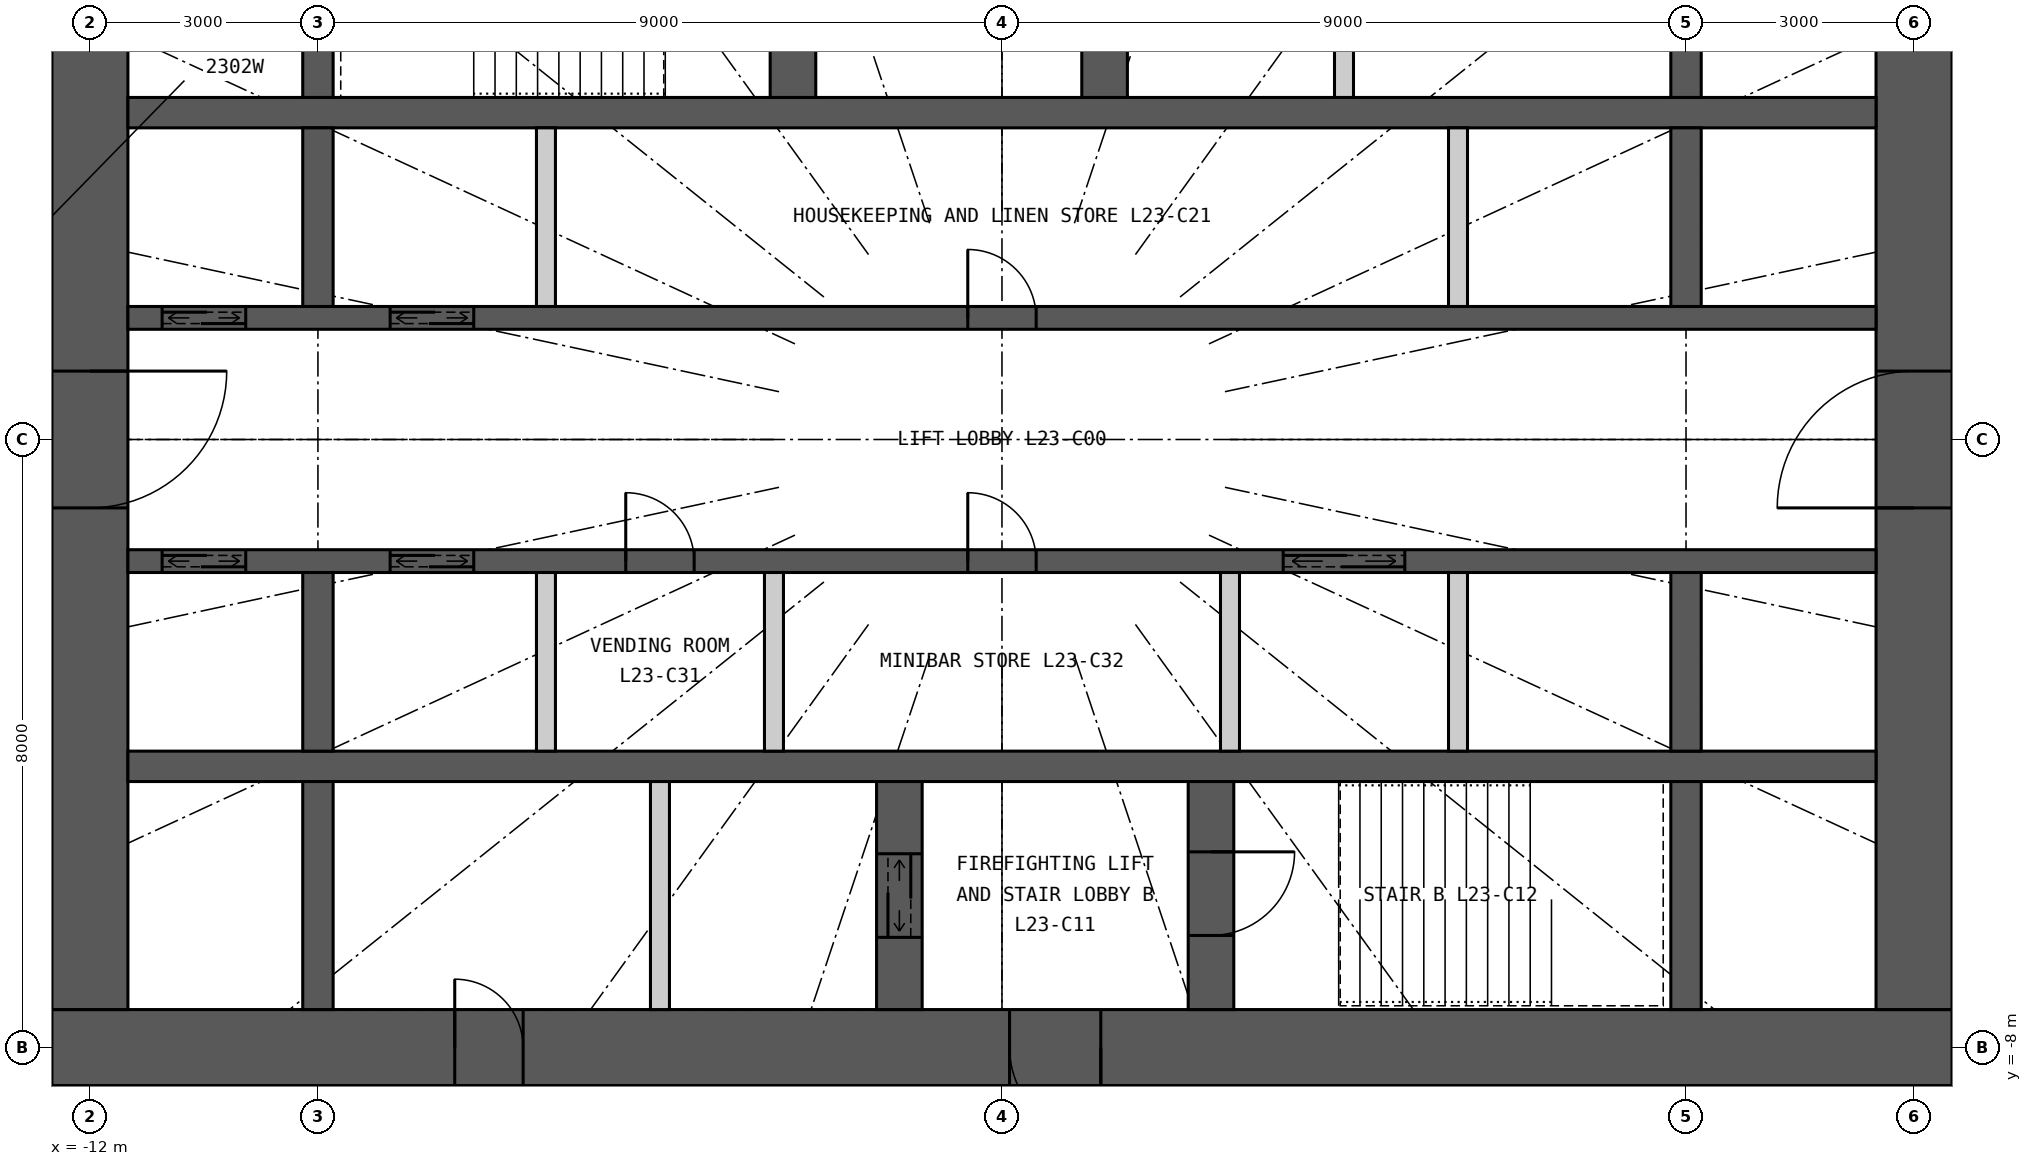
"""IFC4 building model, lengths in metres.
Left out: names, types, materials, properties, quantities, classifications, styles, units other than length and angle.
Written with IfcOpenShell. Run it as: python <this file> out.ifc"""

import sys

from ifc_helpers import new_model, si_unit, direction, frame, frame_2d, origin, place, context, subcontext, project, spatial, rectangle, extrude, element, fill, save


model = new_model("IFC4")
c1 = context("Model", 3, precision=1e-05, world=origin(), true_north=direction((0.0, 1.0)))
c2 = subcontext(c1, "Body", "Model", "MODEL_VIEW")
j1 = project(units=[si_unit("LENGTHUNIT", "METRE"), si_unit("PLANEANGLEUNIT", "RADIAN")], contexts=[c1])
p1 = place(None, origin())
s1 = spatial("IfcSite", under=j1, at=p1, CompositionType="ELEMENT")
p2 = place(p1, origin())
s2 = spatial("IfcBuilding", under=s1, at=p2, CompositionType="ELEMENT")
p3 = place(p2, frame((0.0, 0.0, 90.3)))
s3 = spatial("IfcBuildingStorey", under=s2, at=p3, CompositionType="ELEMENT", Elevation=90.3)
p4 = place(p3, frame((12.5, -8.0, 0.0), z_axis=(0.0, 0.0, 1.0), x_axis=(-1.0, 0.0, 0.0)))
e1 = element("IfcWall", 1, at=p4, inside=s3, PredefinedType="SHEAR", context=c2, shape_type="SweptSolid", body=[
    extrude(rectangle(XDim=25.0, YDim=1.0, at=frame_2d((12.5, 0.0))), origin(), (0.0, 0.0, 1.0), 3.3),
])
p5 = place(p4, frame((11.2, 0.0, 0.0)))
e2 = element("IfcOpeningElement", 2, at=p5, cuts=e1, PredefinedType="OPENING", context=c2, shape_type="SweptSolid", body=[
    extrude(rectangle(XDim=1.2, YDim=2.2, at=frame_2d((0.6, 1.1))), frame((0.0, 0.51, 0.0), z_axis=(0.0, -1.0, 0.0), x_axis=(1.0, 0.0, 0.0)), (0.0, 0.0, 1.0), 1.02),
])
p6 = place(p4, frame((18.8, 0.0, 0.0)))
e3 = element("IfcOpeningElement", 3, at=p6, cuts=e1, PredefinedType="OPENING", context=c2, shape_type="SweptSolid", body=[
    extrude(rectangle(XDim=0.9, YDim=2.2, at=frame_2d((0.45, 1.1))), frame((0.0, 0.51, 0.0), z_axis=(0.0, -1.0, 0.0), x_axis=(1.0, 0.0, 0.0)), (0.0, 0.0, 1.0), 1.02),
])
p7 = place(p3, frame((12.0, -7.5, 0.0), z_axis=(0.0, 0.0, 1.0), x_axis=(0.0, 1.0, 0.0)))
e4 = element("IfcWall", 4, at=p7, inside=s3, PredefinedType="SHEAR", context=c2, shape_type="SweptSolid", body=[
    extrude(rectangle(XDim=15.0, YDim=1.0, at=frame_2d((7.5, 0.0))), origin(), (0.0, 0.0, 1.0), 3.3),
])
p8 = place(p7, frame((6.6, 0.0, 0.0)))
e5 = element("IfcOpeningElement", 5, at=p8, cuts=e4, PredefinedType="OPENING", context=c2, shape_type="SweptSolid", body=[
    extrude(rectangle(XDim=1.8, YDim=2.2, at=frame_2d((0.9, 1.1))), frame((0.0, 0.51, 0.0), z_axis=(0.0, -1.0, 0.0), x_axis=(1.0, 0.0, 0.0)), (0.0, 0.0, 1.0), 1.02),
])
p9 = place(p3, frame((-12.0, 7.5, 0.0), z_axis=(0.0, 0.0, 1.0), x_axis=(0.0, -1.0, 0.0)))
e6 = element("IfcWall", 6, at=p9, inside=s3, PredefinedType="SHEAR", context=c2, shape_type="SweptSolid", body=[
    extrude(rectangle(XDim=15.0, YDim=1.0, at=frame_2d((7.5, 0.0))), origin(), (0.0, 0.0, 1.0), 3.3),
])
p10 = place(p9, frame((6.6, 0.0, 0.0)))
e7 = element("IfcOpeningElement", 7, at=p10, cuts=e6, PredefinedType="OPENING", context=c2, shape_type="SweptSolid", body=[
    extrude(rectangle(XDim=1.8, YDim=2.2, at=frame_2d((0.9, 1.1))), frame((0.0, 0.51, 0.0), z_axis=(0.0, -1.0, 0.0), x_axis=(1.0, 0.0, 0.0)), (0.0, 0.0, 1.0), 1.02),
])
p11 = place(p3, frame((-11.5, 4.3, 0.0), z_axis=(0.0, 0.0, 1.0), x_axis=(1.0, 0.0, 0.0)))
e8 = element("IfcWall", 8, at=p11, inside=s3, PredefinedType="SHEAR", context=c2, shape_type="SweptSolid", body=[
    extrude(rectangle(XDim=23.0, YDim=0.4, at=frame_2d((11.5, 0.0))), origin(), (0.0, 0.0, 1.0), 3.3),
])
p12 = place(p3, frame((-11.5, 1.6, 0.0), z_axis=(0.0, 0.0, 1.0), x_axis=(1.0, 0.0, 0.0)))
e9 = element("IfcWall", 9, at=p12, inside=s3, PredefinedType="SHEAR", context=c2, shape_type="SweptSolid", body=[
    extrude(rectangle(XDim=23.0, YDim=0.3, at=frame_2d((11.5, 0.0))), origin(), (0.0, 0.0, 1.0), 3.3),
])
p13 = place(p12, frame((0.45, 0.0, 0.0)))
e10 = element("IfcOpeningElement", 10, at=p13, cuts=e9, PredefinedType="OPENING", context=c2, shape_type="SweptSolid", body=[
    extrude(rectangle(XDim=1.1, YDim=2.2, at=frame_2d((0.55, 1.1))), frame((0.0, 0.16, 0.0), z_axis=(0.0, -1.0, 0.0), x_axis=(1.0, 0.0, 0.0)), (0.0, 0.0, 1.0), 0.32),
])
p14 = place(p12, frame((3.45, 0.0, 0.0)))
e11 = element("IfcOpeningElement", 11, at=p14, cuts=e9, PredefinedType="OPENING", context=c2, shape_type="SweptSolid", body=[
    extrude(rectangle(XDim=1.1, YDim=2.2, at=frame_2d((0.55, 1.1))), frame((0.0, 0.16, 0.0), z_axis=(0.0, -1.0, 0.0), x_axis=(1.0, 0.0, 0.0)), (0.0, 0.0, 1.0), 0.32),
])
p15 = place(p12, frame((11.05, 0.0, 0.0)))
e12 = element("IfcOpeningElement", 12, at=p15, cuts=e9, PredefinedType="OPENING", context=c2, shape_type="SweptSolid", body=[
    extrude(rectangle(XDim=0.9, YDim=2.2, at=frame_2d((0.45, 1.1))), frame((0.0, 0.16, 0.0), z_axis=(0.0, -1.0, 0.0), x_axis=(1.0, 0.0, 0.0)), (0.0, 0.0, 1.0), 0.32),
])
p16 = place(p3, frame((-11.5, -4.3, 0.0), z_axis=(0.0, 0.0, 1.0), x_axis=(1.0, 0.0, 0.0)))
e13 = element("IfcWall", 13, at=p16, inside=s3, PredefinedType="SHEAR", context=c2, shape_type="SweptSolid", body=[
    extrude(rectangle(XDim=23.0, YDim=0.4, at=frame_2d((11.5, 0.0))), origin(), (0.0, 0.0, 1.0), 3.3),
])
p17 = place(p3, frame((-11.5, -1.6, 0.0), z_axis=(0.0, 0.0, 1.0), x_axis=(1.0, 0.0, 0.0)))
e14 = element("IfcWall", 14, at=p17, inside=s3, PredefinedType="SHEAR", context=c2, shape_type="SweptSolid", body=[
    extrude(rectangle(XDim=23.0, YDim=0.3, at=frame_2d((11.5, 0.0))), origin(), (0.0, 0.0, 1.0), 3.3),
])
p18 = place(p17, frame((0.45, 0.0, 0.0)))
e15 = element("IfcOpeningElement", 15, at=p18, cuts=e14, PredefinedType="OPENING", context=c2, shape_type="SweptSolid", body=[
    extrude(rectangle(XDim=1.1, YDim=2.2, at=frame_2d((0.55, 1.1))), frame((0.0, 0.16, 0.0), z_axis=(0.0, -1.0, 0.0), x_axis=(1.0, 0.0, 0.0)), (0.0, 0.0, 1.0), 0.32),
])
p19 = place(p17, frame((3.45, 0.0, 0.0)))
e16 = element("IfcOpeningElement", 16, at=p19, cuts=e14, PredefinedType="OPENING", context=c2, shape_type="SweptSolid", body=[
    extrude(rectangle(XDim=1.1, YDim=2.2, at=frame_2d((0.55, 1.1))), frame((0.0, 0.16, 0.0), z_axis=(0.0, -1.0, 0.0), x_axis=(1.0, 0.0, 0.0)), (0.0, 0.0, 1.0), 0.32),
])
p20 = place(p17, frame((15.2, 0.0, 0.0)))
e17 = element("IfcOpeningElement", 17, at=p20, cuts=e14, PredefinedType="OPENING", context=c2, shape_type="SweptSolid", body=[
    extrude(rectangle(XDim=1.6, YDim=2.4, at=frame_2d((0.8, 1.2))), frame((0.0, 0.16, 0.0), z_axis=(0.0, -1.0, 0.0), x_axis=(1.0, 0.0, 0.0)), (0.0, 0.0, 1.0), 0.32),
])
p21 = place(p17, frame((6.55, 0.0, 0.0)))
e18 = element("IfcOpeningElement", 18, at=p21, cuts=e14, PredefinedType="OPENING", context=c2, shape_type="SweptSolid", body=[
    extrude(rectangle(XDim=0.9, YDim=2.2, at=frame_2d((0.45, 1.1))), frame((0.0, 0.16, 0.0), z_axis=(0.0, -1.0, 0.0), x_axis=(1.0, 0.0, 0.0)), (0.0, 0.0, 1.0), 0.32),
])
p22 = place(p17, frame((11.05, 0.0, 0.0)))
e19 = element("IfcOpeningElement", 19, at=p22, cuts=e14, PredefinedType="OPENING", context=c2, shape_type="SweptSolid", body=[
    extrude(rectangle(XDim=0.9, YDim=2.2, at=frame_2d((0.45, 1.1))), frame((0.0, 0.16, 0.0), z_axis=(0.0, -1.0, 0.0), x_axis=(1.0, 0.0, 0.0)), (0.0, 0.0, 1.0), 0.32),
])
p23 = place(p3, frame((-9.0, 4.5, 0.0), z_axis=(0.0, 0.0, 1.0), x_axis=(0.0, 1.0, 0.0)))
e20 = element("IfcWall", 20, at=p23, inside=s3, PredefinedType="SHEAR", context=c2, shape_type="SweptSolid", body=[
    extrude(rectangle(XDim=3.0, YDim=0.4, at=frame_2d((1.5, 0.0))), origin(), (0.0, 0.0, 1.0), 3.3),
])
for number, where, z_axis, x_axis in (
    (21, (-9.0, 1.75, 0.0), (0.0, 0.0, 1.0), (0.0, 1.0, 0.0)),
    (22, (-9.0, -4.1, 0.0), (0.0, 0.0, 1.0), (0.0, 1.0, 0.0)),
):
    element("IfcWall", number, at=place(p3, frame(where, z_axis=z_axis, x_axis=x_axis)), inside=s3, PredefinedType="SHEAR", context=c2, shape_type="SweptSolid", body=[
        extrude(rectangle(XDim=2.35, YDim=0.4, at=frame_2d((1.175, 0.0))), origin(), (0.0, 0.0, 1.0), 3.3),
    ])
for number, where, z_axis, x_axis in (
    (23, (-9.0, -7.5, 0.0), (0.0, 0.0, 1.0), (0.0, 1.0, 0.0)),
    (24, (9.0, 4.5, 0.0), (0.0, 0.0, 1.0), (0.0, 1.0, 0.0)),
):
    element("IfcWall", number, at=place(p3, frame(where, z_axis=z_axis, x_axis=x_axis)), inside=s3, PredefinedType="SHEAR", context=c2, shape_type="SweptSolid", body=[
        extrude(rectangle(XDim=3.0, YDim=0.4, at=frame_2d((1.5, 0.0))), origin(), (0.0, 0.0, 1.0), 3.3),
    ])
for number, where, z_axis, x_axis in (
    (25, (9.0, 1.75, 0.0), (0.0, 0.0, 1.0), (0.0, 1.0, 0.0)),
    (26, (9.0, -4.1, 0.0), (0.0, 0.0, 1.0), (0.0, 1.0, 0.0)),
):
    element("IfcWall", number, at=place(p3, frame(where, z_axis=z_axis, x_axis=x_axis)), inside=s3, PredefinedType="SHEAR", context=c2, shape_type="SweptSolid", body=[
        extrude(rectangle(XDim=2.35, YDim=0.4, at=frame_2d((1.175, 0.0))), origin(), (0.0, 0.0, 1.0), 3.3),
    ])
p24 = place(p3, frame((9.0, -7.5, 0.0), z_axis=(0.0, 0.0, 1.0), x_axis=(0.0, 1.0, 0.0)))
e27 = element("IfcWall", 27, at=p24, inside=s3, PredefinedType="SHEAR", context=c2, shape_type="SweptSolid", body=[
    extrude(rectangle(XDim=3.0, YDim=0.4, at=frame_2d((1.5, 0.0))), origin(), (0.0, 0.0, 1.0), 3.3),
])
p25 = place(p3, frame((-2.75, 4.5, 0.0), z_axis=(0.0, 0.0, 1.0), x_axis=(0.0, 1.0, 0.0)))
e28 = element("IfcWall", 28, at=p25, inside=s3, PredefinedType="SHEAR", context=c2, shape_type="SweptSolid", body=[
    extrude(rectangle(XDim=3.0, YDim=0.6, at=frame_2d((1.5, 0.0))), origin(), (0.0, 0.0, 1.0), 3.3),
])
p26 = place(p25, frame((0.925, 0.0, 0.0)))
e29 = element("IfcOpeningElement", 29, at=p26, cuts=e28, PredefinedType="OPENING", context=c2, shape_type="SweptSolid", body=[
    extrude(rectangle(XDim=1.1, YDim=2.2, at=frame_2d((0.55, 1.1))), frame((0.0, 0.31, 0.0), z_axis=(0.0, -1.0, 0.0), x_axis=(1.0, 0.0, 0.0)), (0.0, 0.0, 1.0), 0.62),
])
p27 = place(p3, frame((1.35, 4.5, 0.0), z_axis=(0.0, 0.0, 1.0), x_axis=(0.0, 1.0, 0.0)))
e30 = element("IfcWall", 30, at=p27, inside=s3, PredefinedType="SHEAR", context=c2, shape_type="SweptSolid", body=[
    extrude(rectangle(XDim=3.0, YDim=0.6, at=frame_2d((1.5, 0.0))), origin(), (0.0, 0.0, 1.0), 3.3),
])
p28 = place(p27, frame((0.95, 0.0, 0.0)))
e31 = element("IfcOpeningElement", 31, at=p28, cuts=e30, PredefinedType="OPENING", context=c2, shape_type="SweptSolid", body=[
    extrude(rectangle(XDim=1.1, YDim=2.2, at=frame_2d((0.55, 1.1))), frame((0.0, 0.31, 0.0), z_axis=(0.0, -1.0, 0.0), x_axis=(1.0, 0.0, 0.0)), (0.0, 0.0, 1.0), 0.62),
])
p29 = place(p3, frame((4.5, 4.5, 0.0), z_axis=(0.0, 0.0, 1.0), x_axis=(0.0, 1.0, 0.0)))
e32 = element("IfcWall", 32, at=p29, inside=s3, PredefinedType="PARTITIONING", context=c2, shape_type="SweptSolid", body=[
    extrude(rectangle(XDim=3.0, YDim=0.25, at=frame_2d((1.5, 0.0))), origin(), (0.0, 0.0, 1.0), 3.3),
])
p30 = place(p3, frame((2.75, -7.5, 0.0), z_axis=(0.0, 0.0, 1.0), x_axis=(0.0, 1.0, 0.0)))
e33 = element("IfcWall", 33, at=p30, inside=s3, PredefinedType="SHEAR", context=c2, shape_type="SweptSolid", body=[
    extrude(rectangle(XDim=3.0, YDim=0.6, at=frame_2d((1.5, 0.0))), origin(), (0.0, 0.0, 1.0), 3.3),
])
p31 = place(p30, frame((0.975, 0.0, 0.0)))
e34 = element("IfcOpeningElement", 34, at=p31, cuts=e33, PredefinedType="OPENING", context=c2, shape_type="SweptSolid", body=[
    extrude(rectangle(XDim=1.1, YDim=2.2, at=frame_2d((0.55, 1.1))), frame((0.0, 0.31, 0.0), z_axis=(0.0, -1.0, 0.0), x_axis=(1.0, 0.0, 0.0)), (0.0, 0.0, 1.0), 0.62),
])
p32 = place(p3, frame((-1.35, -7.5, 0.0), z_axis=(0.0, 0.0, 1.0), x_axis=(0.0, 1.0, 0.0)))
e35 = element("IfcWall", 35, at=p32, inside=s3, PredefinedType="SHEAR", context=c2, shape_type="SweptSolid", body=[
    extrude(rectangle(XDim=3.0, YDim=0.6, at=frame_2d((1.5, 0.0))), origin(), (0.0, 0.0, 1.0), 3.3),
])
p33 = place(p32, frame((0.95, 0.0, 0.0)))
e36 = element("IfcOpeningElement", 36, at=p33, cuts=e35, PredefinedType="OPENING", context=c2, shape_type="SweptSolid", body=[
    extrude(rectangle(XDim=1.1, YDim=2.2, at=frame_2d((0.55, 1.1))), frame((0.0, 0.31, 0.0), z_axis=(0.0, -1.0, 0.0), x_axis=(1.0, 0.0, 0.0)), (0.0, 0.0, 1.0), 0.62),
])
p34 = place(p3, frame((-4.5, -7.5, 0.0), z_axis=(0.0, 0.0, 1.0), x_axis=(0.0, 1.0, 0.0)))
e37 = element("IfcWall", 37, at=p34, inside=s3, PredefinedType="PARTITIONING", context=c2, shape_type="SweptSolid", body=[
    extrude(rectangle(XDim=3.0, YDim=0.25, at=frame_2d((1.5, 0.0))), origin(), (0.0, 0.0, 1.0), 3.3),
])
for number, where, z_axis, x_axis in (
    (38, (-6.0, 1.75, 0.0), (0.0, 0.0, 1.0), (0.0, 1.0, 0.0)),
    (39, (6.0, 1.75, 0.0), (0.0, 0.0, 1.0), (0.0, 1.0, 0.0)),
    (40, (-6.0, -4.1, 0.0), (0.0, 0.0, 1.0), (0.0, 1.0, 0.0)),
    (41, (-3.0, -4.1, 0.0), (0.0, 0.0, 1.0), (0.0, 1.0, 0.0)),
    (42, (3.0, -4.1, 0.0), (0.0, 0.0, 1.0), (0.0, 1.0, 0.0)),
    (43, (6.0, -4.1, 0.0), (0.0, 0.0, 1.0), (0.0, 1.0, 0.0)),
):
    element("IfcWall", number, at=place(p3, frame(where, z_axis=z_axis, x_axis=x_axis)), inside=s3, PredefinedType="PARTITIONING", context=c2, shape_type="SweptSolid", body=[
        extrude(rectangle(XDim=2.35, YDim=0.25, at=frame_2d((1.175, 0.0))), origin(), (0.0, 0.0, 1.0), 3.3),
    ])
p35 = place(p5, origin())
e44 = element("IfcDoor", 44, at=p35, inside=s3, OperationType="SINGLE_SWING_LEFT", PredefinedType="DOOR", context=c2, shape_type="SweptSolid", body=[
    extrude(rectangle(XDim=1.2, YDim=2.2, at=frame_2d((0.6, 1.1))), frame((0.0, 0.025, 0.0), z_axis=(0.0, -1.0, 0.0), x_axis=(1.0, 0.0, 0.0)), (0.0, 0.0, 1.0), 0.05),
])
fill(e2, e44)
p36 = place(p31, origin())
e45 = element("IfcDoor", 45, at=p36, inside=s3, OperationType="SINGLE_SWING_RIGHT", PredefinedType="DOOR", context=c2, shape_type="SweptSolid", body=[
    extrude(rectangle(XDim=1.1, YDim=2.2, at=frame_2d((0.55, 1.1))), frame((0.0, 0.025, 0.0), z_axis=(0.0, -1.0, 0.0), x_axis=(1.0, 0.0, 0.0)), (0.0, 0.0, 1.0), 0.05),
])
fill(e34, e45)
p37 = place(p33, origin())
e46 = element("IfcDoor", 46, at=p37, inside=s3, OperationType="DOUBLE_DOOR_SLIDING", PredefinedType="DOOR", context=c2, shape_type="SweptSolid", body=[
    extrude(rectangle(XDim=1.1, YDim=2.2, at=frame_2d((0.55, 1.1))), frame((0.0, 0.025, 0.0), z_axis=(0.0, -1.0, 0.0), x_axis=(1.0, 0.0, 0.0)), (0.0, 0.0, 1.0), 0.05),
])
fill(e36, e46)
p38 = place(p6, origin())
e47 = element("IfcDoor", 47, at=p38, inside=s3, OperationType="SINGLE_SWING_RIGHT", PredefinedType="DOOR", context=c2, shape_type="SweptSolid", body=[
    extrude(rectangle(XDim=0.9, YDim=2.2, at=frame_2d((0.45, 1.1))), frame((0.0, 0.025, 0.0), z_axis=(0.0, -1.0, 0.0), x_axis=(1.0, 0.0, 0.0)), (0.0, 0.0, 1.0), 0.05),
])
fill(e3, e47)
p39 = place(p13, origin())
e48 = element("IfcDoor", 48, at=p39, inside=s3, OperationType="DOUBLE_DOOR_SLIDING", PredefinedType="DOOR", context=c2, shape_type="SweptSolid", body=[
    extrude(rectangle(XDim=1.1, YDim=2.2, at=frame_2d((0.55, 1.1))), frame((0.0, 0.025, 0.0), z_axis=(0.0, -1.0, 0.0), x_axis=(1.0, 0.0, 0.0)), (0.0, 0.0, 1.0), 0.05),
])
fill(e10, e48)
p40 = place(p14, origin())
e49 = element("IfcDoor", 49, at=p40, inside=s3, OperationType="DOUBLE_DOOR_SLIDING", PredefinedType="DOOR", context=c2, shape_type="SweptSolid", body=[
    extrude(rectangle(XDim=1.1, YDim=2.2, at=frame_2d((0.55, 1.1))), frame((0.0, 0.025, 0.0), z_axis=(0.0, -1.0, 0.0), x_axis=(1.0, 0.0, 0.0)), (0.0, 0.0, 1.0), 0.05),
])
fill(e11, e49)
p41 = place(p18, origin())
e50 = element("IfcDoor", 50, at=p41, inside=s3, OperationType="DOUBLE_DOOR_SLIDING", PredefinedType="DOOR", context=c2, shape_type="SweptSolid", body=[
    extrude(rectangle(XDim=1.1, YDim=2.2, at=frame_2d((0.55, 1.1))), frame((0.0, 0.025, 0.0), z_axis=(0.0, -1.0, 0.0), x_axis=(1.0, 0.0, 0.0)), (0.0, 0.0, 1.0), 0.05),
])
fill(e15, e50)
p42 = place(p19, origin())
e51 = element("IfcDoor", 51, at=p42, inside=s3, OperationType="DOUBLE_DOOR_SLIDING", PredefinedType="DOOR", context=c2, shape_type="SweptSolid", body=[
    extrude(rectangle(XDim=1.1, YDim=2.2, at=frame_2d((0.55, 1.1))), frame((0.0, 0.025, 0.0), z_axis=(0.0, -1.0, 0.0), x_axis=(1.0, 0.0, 0.0)), (0.0, 0.0, 1.0), 0.05),
])
fill(e16, e51)
p43 = place(p20, origin())
e52 = element("IfcDoor", 52, at=p43, inside=s3, OperationType="DOUBLE_DOOR_SLIDING", PredefinedType="DOOR", context=c2, shape_type="SweptSolid", body=[
    extrude(rectangle(XDim=1.6, YDim=2.4, at=frame_2d((0.8, 1.2))), frame((0.0, 0.025, 0.0), z_axis=(0.0, -1.0, 0.0), x_axis=(1.0, 0.0, 0.0)), (0.0, 0.0, 1.0), 0.05),
])
fill(e17, e52)
p44 = place(p15, origin())
e53 = element("IfcDoor", 53, at=p44, inside=s3, OperationType="SINGLE_SWING_LEFT", PredefinedType="DOOR", context=c2, shape_type="SweptSolid", body=[
    extrude(rectangle(XDim=0.9, YDim=2.2, at=frame_2d((0.45, 1.1))), frame((0.0, 0.025, 0.0), z_axis=(0.0, -1.0, 0.0), x_axis=(1.0, 0.0, 0.0)), (0.0, 0.0, 1.0), 0.05),
])
fill(e12, e53)
p45 = place(p21, origin())
e54 = element("IfcDoor", 54, at=p45, inside=s3, OperationType="SINGLE_SWING_LEFT", PredefinedType="DOOR", context=c2, shape_type="SweptSolid", body=[
    extrude(rectangle(XDim=0.9, YDim=2.2, at=frame_2d((0.45, 1.1))), frame((0.0, 0.025, 0.0), z_axis=(0.0, -1.0, 0.0), x_axis=(1.0, 0.0, 0.0)), (0.0, 0.0, 1.0), 0.05),
])
fill(e18, e54)
p46 = place(p22, origin())
e55 = element("IfcDoor", 55, at=p46, inside=s3, OperationType="SINGLE_SWING_LEFT", PredefinedType="DOOR", context=c2, shape_type="SweptSolid", body=[
    extrude(rectangle(XDim=0.9, YDim=2.2, at=frame_2d((0.45, 1.1))), frame((0.0, 0.025, 0.0), z_axis=(0.0, -1.0, 0.0), x_axis=(1.0, 0.0, 0.0)), (0.0, 0.0, 1.0), 0.05),
])
fill(e19, e55)
p47 = place(p8, origin())
e56 = element("IfcDoor", 56, at=p47, inside=s3, OperationType="DOUBLE_DOOR_DOUBLE_SWING", PredefinedType="DOOR", context=c2, shape_type="SweptSolid", body=[
    extrude(rectangle(XDim=1.8, YDim=2.2, at=frame_2d((0.9, 1.1))), frame((0.0, 0.025, 0.0), z_axis=(0.0, -1.0, 0.0), x_axis=(1.0, 0.0, 0.0)), (0.0, 0.0, 1.0), 0.05),
])
fill(e5, e56)
p48 = place(p10, origin())
e57 = element("IfcDoor", 57, at=p48, inside=s3, OperationType="DOUBLE_DOOR_DOUBLE_SWING", PredefinedType="DOOR", context=c2, shape_type="SweptSolid", body=[
    extrude(rectangle(XDim=1.8, YDim=2.2, at=frame_2d((0.9, 1.1))), frame((0.0, 0.025, 0.0), z_axis=(0.0, -1.0, 0.0), x_axis=(1.0, 0.0, 0.0)), (0.0, 0.0, 1.0), 0.05),
])
fill(e7, e57)
save(model, sys.argv[1])
